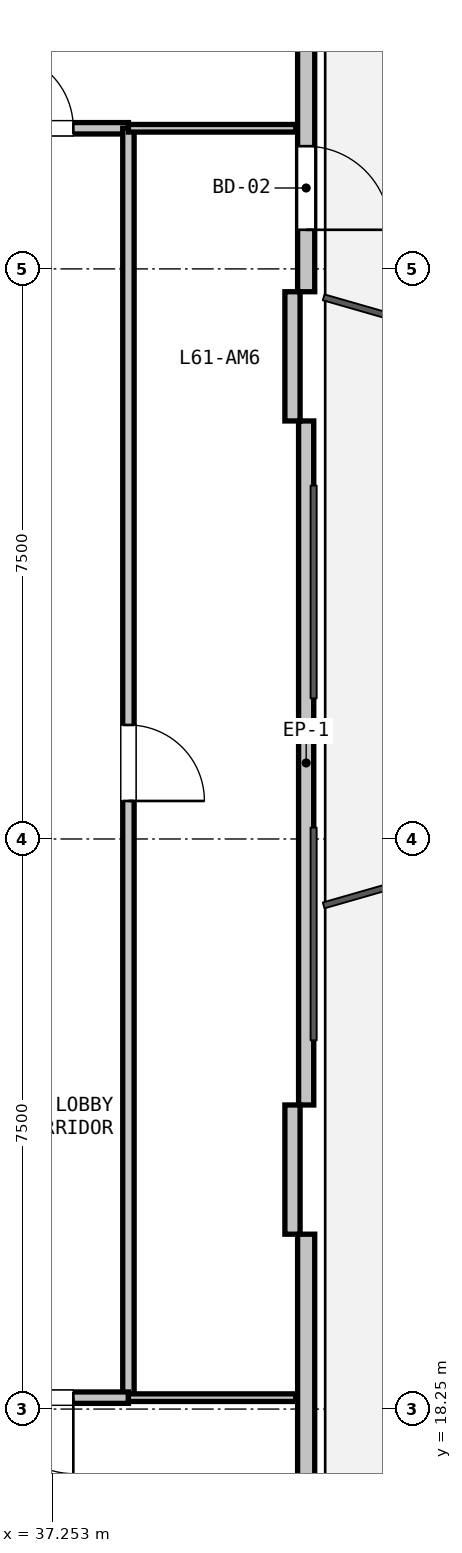
"""IFC4 building model, lengths in metres.
Left out: names, types, materials, properties, quantities, classifications, styles, units other than length and angle.
Written with IfcOpenShell. Run it as: python <this file> out.ifc"""

import sys

from ifc_helpers import new_model, si_unit, direction, frame, frame_2d, origin, place, context, subcontext, project, spatial, rectangle, extrude, element, fill, save


model = new_model("IFC4")
c1 = context("Model", 3, precision=1e-05, world=origin(), true_north=direction((0.0, 1.0)))
c2 = subcontext(c1, "Body", "Model", "MODEL_VIEW")
j1 = project(units=[si_unit("LENGTHUNIT", "METRE"), si_unit("PLANEANGLEUNIT", "RADIAN")], contexts=[c1])
p1 = place(None, origin())
s1 = spatial("IfcSite", under=j1, at=p1, CompositionType="ELEMENT")
p2 = place(p1, origin())
s2 = spatial("IfcBuilding", under=s1, at=p2, CompositionType="ELEMENT")
p3 = place(p2, frame((0.0, 0.0, 218.4)))
s3 = spatial("IfcBuildingStorey", under=s2, at=p3, CompositionType="ELEMENT", Elevation=218.4)
p4 = place(p3, frame((40.588, 42.648, 0.0), z_axis=(0.0, 0.0, 1.0), x_axis=(0.0, -1.0, 0.0)))
e1 = element("IfcWall", 1, at=p4, inside=s3, PredefinedType="SOLIDWALL", context=c2, shape_type="SweptSolid", body=[
    extrude(rectangle(XDim=9.699, YDim=0.225, at=frame_2d((4.85, 0.0))), origin(), (0.0, 0.0, 1.0), 3.215),
])
p5 = place(p4, frame((7.784, 0.0, 0.0)))
e2 = element("IfcOpeningElement", 2, at=p5, cuts=e1, PredefinedType="OPENING", context=c2, shape_type="SweptSolid", body=[
    extrude(rectangle(XDim=1.1, YDim=2.1, at=frame_2d((0.55, 1.05))), frame((0.0, 0.123, 0.0), z_axis=(0.0, -1.0, 0.0), x_axis=(1.0, 0.0, 0.0)), (0.0, 0.0, 1.0), 0.245),
])
p6 = place(p3, frame((40.588, 31.25, 0.0), z_axis=(0.0, 0.0, 1.0), x_axis=(0.0, -1.0, 0.0)))
e3 = element("IfcWall", 3, at=p6, inside=s3, PredefinedType="PARAPET", context=c2, shape_type="SweptSolid", body=[
    extrude(rectangle(XDim=8.999, YDim=0.2, at=frame_2d((4.5, 0.0))), origin(), (0.0, 0.0, 1.0), 0.2),
])
p7 = place(p3, frame((40.588, 20.551, 0.0), z_axis=(0.0, 0.0, 1.0), x_axis=(0.0, -1.0, 0.0)))
e4 = element("IfcWall", 4, at=p7, inside=s3, PredefinedType="SOLIDWALL", context=c2, shape_type="SweptSolid", body=[
    extrude(rectangle(XDim=9.699, YDim=0.225, at=frame_2d((4.85, 0.0))), origin(), (0.0, 0.0, 1.0), 3.215),
])
p8 = place(p7, frame((5.693, 0.0, 0.9)))
e5 = element("IfcOpeningElement", 5, at=p8, cuts=e4, PredefinedType="OPENING", context=c2, shape_type="SweptSolid", body=[
    extrude(rectangle(XDim=2.4, YDim=2.2, at=frame_2d((1.2, 1.1))), frame((0.0, 0.123, 0.0), z_axis=(0.0, -1.0, 0.0), x_axis=(1.0, 0.0, 0.0)), (0.0, 0.0, 1.0), 0.245),
])
for number, where, z_axis, x_axis in (
    (6, (40.408, 32.949, 0.0), (0.0, 0.0, 1.0), (0.0, -1.0, 0.0)),
    (7, (40.408, 22.25, 0.0), (0.0, 0.0, 1.0), (0.0, -1.0, 0.0)),
):
    element("IfcWall", number, at=place(p3, frame(where, z_axis=z_axis, x_axis=x_axis)), inside=s3, PredefinedType="PARAPET", context=c2, shape_type="SweptSolid", body=[
        extrude(rectangle(XDim=1.7, YDim=0.2, at=frame_2d((0.85, 0.0))), origin(), (0.0, 0.0, 1.0), 4.2),
    ])
p9 = place(p3, frame((35.8, 35.1, 0.0), z_axis=(0.0, 0.0, 1.0), x_axis=(1.0, 0.0, 0.0)))
e8 = element("IfcWall", 8, at=p9, inside=s3, PredefinedType="PARTITIONING", context=c2, shape_type="SweptSolid", body=[
    extrude(rectangle(XDim=2.45, YDim=0.15, at=frame_2d((1.225, 0.0))), origin(), (0.0, 0.0, 1.0), 3.215),
])
p10 = place(p9, frame((0.725, 0.0, 0.0)))
e9 = element("IfcOpeningElement", 9, at=p10, cuts=e8, PredefinedType="OPENING", context=c2, shape_type="SweptSolid", body=[
    extrude(rectangle(XDim=1.0, YDim=2.15, at=frame_2d((0.5, 1.075))), frame((0.0, 0.085, 0.0), z_axis=(0.0, -1.0, 0.0), x_axis=(1.0, 0.0, 0.0)), (0.0, 0.0, 1.0), 0.17),
])
p11 = place(p3, frame((38.25, 35.1, 0.0), z_axis=(0.0, 0.0, 1.0), x_axis=(0.0, -1.0, 0.0)))
e10 = element("IfcWall", 10, at=p11, inside=s3, PredefinedType="PARTITIONING", context=c2, shape_type="SweptSolid", body=[
    extrude(rectangle(XDim=16.7, YDim=0.15, at=frame_2d((8.35, 0.0))), origin(), (0.0, 0.0, 1.0), 3.215),
])
p12 = place(p11, frame((7.85, 0.0, 0.0)))
e11 = element("IfcOpeningElement", 11, at=p12, cuts=e10, PredefinedType="OPENING", context=c2, shape_type="SweptSolid", body=[
    extrude(rectangle(XDim=1.0, YDim=2.15, at=frame_2d((0.5, 1.075))), frame((0.0, 0.085, 0.0), z_axis=(0.0, -1.0, 0.0), x_axis=(1.0, 0.0, 0.0)), (0.0, 0.0, 1.0), 0.17),
])
p13 = place(p3, frame((38.25, 18.4, 0.0), z_axis=(0.0, 0.0, 1.0), x_axis=(-1.0, 0.0, 0.0)))
e12 = element("IfcWall", 12, at=p13, inside=s3, PredefinedType="PARTITIONING", context=c2, shape_type="SweptSolid", body=[
    extrude(rectangle(XDim=2.45, YDim=0.15, at=frame_2d((1.225, 0.0))), origin(), (0.0, 0.0, 1.0), 3.215),
])
p14 = place(p13, frame((0.725, 0.0, 0.0)))
e13 = element("IfcOpeningElement", 13, at=p14, cuts=e12, PredefinedType="OPENING", context=c2, shape_type="SweptSolid", body=[
    extrude(rectangle(XDim=1.0, YDim=2.15, at=frame_2d((0.5, 1.075))), frame((0.0, 0.085, 0.0), z_axis=(0.0, -1.0, 0.0), x_axis=(1.0, 0.0, 0.0)), (0.0, 0.0, 1.0), 0.17),
])
for number, where, z_axis, x_axis in (
    (14, (40.452, 35.1, 0.0), (0.0, 0.0, 1.0), (-1.0, 0.0, 0.0)),
    (15, (40.452, 18.4, 0.0), (0.0, 0.0, 1.0), (-1.0, 0.0, 0.0)),
):
    element("IfcWall", number, at=place(p3, frame(where, z_axis=z_axis, x_axis=x_axis)), inside=s3, PredefinedType="PARTITIONING", context=c2, shape_type="SweptSolid", body=[
        extrude(rectangle(XDim=2.202, YDim=0.1, at=frame_2d((1.101, 0.0))), origin(), (0.0, 0.0, 1.0), 2.365),
    ])
p15 = place(p5, origin())
e16 = element("IfcDoor", 16, at=p15, inside=s3, OperationType="SINGLE_SWING_RIGHT", PredefinedType="DOOR", context=c2, shape_type="SweptSolid", body=[
    extrude(rectangle(XDim=1.1, YDim=2.1, at=frame_2d((0.55, 1.05))), frame((0.0, 0.025, 0.0), z_axis=(0.0, -1.0, 0.0), x_axis=(1.0, 0.0, 0.0)), (0.0, 0.0, 1.0), 0.05),
])
fill(e2, e16)
p16 = place(p10, origin())
e17 = element("IfcDoor", 17, at=p16, inside=s3, OperationType="SINGLE_SWING_LEFT", PredefinedType="DOOR", context=c2, shape_type="SweptSolid", body=[
    extrude(rectangle(XDim=1.0, YDim=2.15, at=frame_2d((0.5, 1.075))), frame((0.0, 0.025, 0.0), z_axis=(0.0, -1.0, 0.0), x_axis=(1.0, 0.0, 0.0)), (0.0, 0.0, 1.0), 0.05),
])
fill(e9, e17)
p17 = place(p12, origin())
e18 = element("IfcDoor", 18, at=p17, inside=s3, OperationType="SINGLE_SWING_RIGHT", PredefinedType="DOOR", context=c2, shape_type="SweptSolid", body=[
    extrude(rectangle(XDim=1.0, YDim=2.15, at=frame_2d((0.5, 1.075))), frame((0.0, 0.025, 0.0), z_axis=(0.0, -1.0, 0.0), x_axis=(1.0, 0.0, 0.0)), (0.0, 0.0, 1.0), 0.05),
])
fill(e11, e18)
p18 = place(p14, origin())
e19 = element("IfcDoor", 19, at=p18, inside=s3, OperationType="SINGLE_SWING_LEFT", PredefinedType="DOOR", context=c2, shape_type="SweptSolid", body=[
    extrude(rectangle(XDim=1.0, YDim=2.15, at=frame_2d((0.5, 1.075))), frame((0.0, 0.025, 0.0), z_axis=(0.0, -1.0, 0.0), x_axis=(1.0, 0.0, 0.0)), (0.0, 0.0, 1.0), 0.05),
])
fill(e13, e19)
save(model, sys.argv[1])
